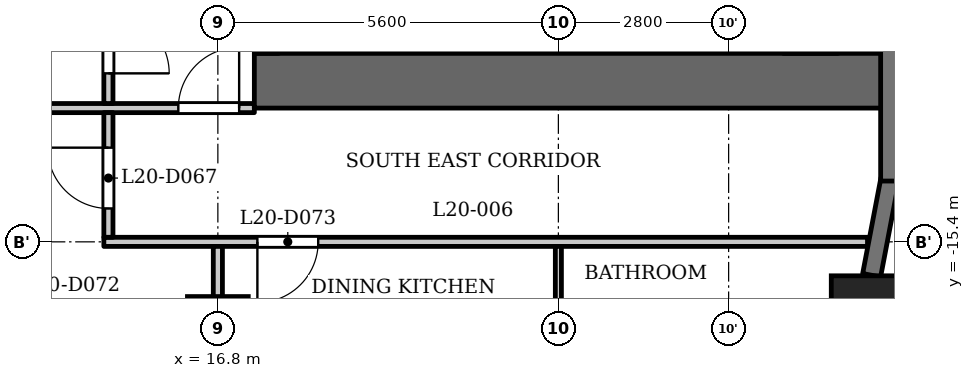
"""IFC4 building model, lengths in metres.
Left out: names, types, materials, properties, quantities, classifications, styles, units other than length and angle.
Written with IfcOpenShell. Run it as: python <this file> out.ifc"""

import sys

from ifc_helpers import new_model, si_unit, direction, frame, frame_2d, origin, origin_2d, place, context, subcontext, project, spatial, rectangle, extrude, element, fill, save


model = new_model("IFC4")
c1 = context("Model", 3, precision=1e-05, world=origin(), true_north=direction((0.0, 1.0)))
c2 = subcontext(c1, "Body", "Model", "MODEL_VIEW")
j1 = project(units=[si_unit("LENGTHUNIT", "METRE"), si_unit("PLANEANGLEUNIT", "RADIAN")], contexts=[c1])
p1 = place(None, origin())
s1 = spatial("IfcSite", under=j1, at=p1, CompositionType="ELEMENT")
p2 = place(p1, origin())
s2 = spatial("IfcBuilding", under=s1, at=p2, CompositionType="ELEMENT")
p3 = place(p2, frame((0.0, 0.0, 83.3)))
s3 = spatial("IfcBuildingStorey", under=s2, at=p3, CompositionType="ELEMENT", Elevation=83.3)
p4 = place(p3, frame((27.538, -16.609, 0.0), z_axis=(0.0, 0.0, 1.0), x_axis=(1.0, 0.0, 0.0)))
e1 = element("IfcColumn", 1, at=p4, inside=s3, PredefinedType="COLUMN", context=c2, shape_type="SweptSolid", body=[
    extrude(rectangle(XDim=1.3, YDim=1.3, at=origin_2d()), origin(), (0.0, 0.0, 1.0), 3.5),
])
p5 = place(p3, frame((16.8, -16.8, 0.0), z_axis=(0.0, 0.0, 1.0), x_axis=(1.0, 0.0, 0.0)))
e2 = element("IfcColumn", 2, at=p5, inside=s3, PredefinedType="COLUMN", context=c2, shape_type="SweptSolid", body=[
    extrude(rectangle(XDim=1.0, YDim=1.0, at=origin_2d()), origin(), (0.0, 0.0, 1.0), 3.5),
])
p6 = place(p3, frame((27.552, -15.949, 0.0), z_axis=(0.0, 0.0, 1.0), x_axis=(0.187279751651, 0.982306619453, 0.0)))
e3 = element("IfcWall", 3, at=p6, inside=s3, PredefinedType="SOLIDWALL", context=c2, shape_type="SweptSolid", body=[
    extrude(rectangle(XDim=1.606, YDim=0.3, at=frame_2d((0.803, 0.0))), origin(), (0.0, 0.0, 1.0), 2.4),
])
p7 = place(p3, frame((27.85, -14.4, 0.0), z_axis=(0.0, 0.0, 1.0), x_axis=(0.0, 1.0, 0.0)))
e4 = element("IfcWall", 4, at=p7, inside=s3, PredefinedType="SOLIDWALL", context=c2, shape_type="SweptSolid", body=[
    extrude(rectangle(XDim=2.55, YDim=0.3, at=frame_2d((1.275, 0.0))), origin(), (0.0, 0.0, 1.0), 2.4),
])
p8 = place(p3, frame((17.4, -12.75, 0.0), z_axis=(0.0, 0.0, 1.0), x_axis=(1.0, 0.0, 0.0)))
e5 = element("IfcWall", 5, at=p8, inside=s3, PredefinedType="SHEAR", context=c2, shape_type="SweptSolid", body=[
    extrude(rectangle(XDim=10.4, YDim=0.9, at=frame_2d((5.2, 0.0))), origin(), (0.0, 0.0, 1.0), 3.2),
])
p9 = place(p3, frame((17.6, -12.3, 0.0), z_axis=(0.0, 0.0, 1.0), x_axis=(0.0, 1.0, 0.0)))
e6 = element("IfcWall", 6, at=p9, inside=s3, PredefinedType="SHEAR", context=c2, shape_type="SweptSolid", body=[
    extrude(rectangle(XDim=24.6, YDim=0.4, at=frame_2d((12.3, 0.0))), origin(), (0.0, 0.0, 1.0), 3.2),
])
p10 = place(p9, frame((6.0, 0.0, 0.0)))
e7 = element("IfcOpeningElement", 7, at=p10, cuts=e6, PredefinedType="OPENING", context=c2, shape_type="SweptSolid", body=[
    extrude(rectangle(XDim=1.1, YDim=2.1, at=frame_2d((0.55, 1.05))), frame((0.0, 0.21, 0.0), z_axis=(0.0, -1.0, 0.0), x_axis=(1.0, 0.0, 0.0)), (0.0, 0.0, 1.0), 0.42),
])
p11 = place(p9, frame((8.4, 0.0, 0.0)))
e8 = element("IfcOpeningElement", 8, at=p11, cuts=e6, PredefinedType="OPENING", context=c2, shape_type="SweptSolid", body=[
    extrude(rectangle(XDim=1.1, YDim=2.1, at=frame_2d((0.55, 1.05))), frame((0.0, 0.21, 0.0), z_axis=(0.0, -1.0, 0.0), x_axis=(1.0, 0.0, 0.0)), (0.0, 0.0, 1.0), 0.42),
])
p12 = place(p9, frame((10.8, 0.0, 0.0)))
e9 = element("IfcOpeningElement", 9, at=p12, cuts=e6, PredefinedType="OPENING", context=c2, shape_type="SweptSolid", body=[
    extrude(rectangle(XDim=1.1, YDim=2.1, at=frame_2d((0.55, 1.05))), frame((0.0, 0.21, 0.0), z_axis=(0.0, -1.0, 0.0), x_axis=(1.0, 0.0, 0.0)), (0.0, 0.0, 1.0), 0.42),
])
p13 = place(p9, frame((16.75, 0.0, 0.0)))
e10 = element("IfcOpeningElement", 10, at=p13, cuts=e6, PredefinedType="OPENING", context=c2, shape_type="SweptSolid", body=[
    extrude(rectangle(XDim=0.9, YDim=2.1, at=frame_2d((0.45, 1.05))), frame((0.0, 0.21, 0.0), z_axis=(0.0, -1.0, 0.0), x_axis=(1.0, 0.0, 0.0)), (0.0, 0.0, 1.0), 0.42),
])
p14 = place(p9, frame((22.8, 0.0, 0.0)))
e11 = element("IfcOpeningElement", 11, at=p14, cuts=e6, PredefinedType="OPENING", context=c2, shape_type="SweptSolid", body=[
    extrude(rectangle(XDim=1.1, YDim=2.1, at=frame_2d((0.55, 1.05))), frame((0.0, 0.21, 0.0), z_axis=(0.0, -1.0, 0.0), x_axis=(1.0, 0.0, 0.0)), (0.0, 0.0, 1.0), 0.42),
])
p15 = place(p9, frame((0.7, 0.0, 0.0)))
e12 = element("IfcOpeningElement", 12, at=p15, cuts=e6, PredefinedType="OPENING", context=c2, shape_type="SweptSolid", body=[
    extrude(rectangle(XDim=1.1, YDim=2.1, at=frame_2d((0.55, 1.05))), frame((0.0, 0.21, 0.0), z_axis=(0.0, -1.0, 0.0), x_axis=(1.0, 0.0, 0.0)), (0.0, 0.0, 1.0), 0.42),
])
p16 = place(p9, frame((12.775, 0.0, 0.0)))
e13 = element("IfcOpeningElement", 13, at=p16, cuts=e6, PredefinedType="OPENING", context=c2, shape_type="SweptSolid", body=[
    extrude(rectangle(XDim=1.8, YDim=2.1, at=frame_2d((0.9, 1.05))), frame((0.0, 0.21, 0.0), z_axis=(0.0, -1.0, 0.0), x_axis=(1.0, 0.0, 0.0)), (0.0, 0.0, 1.0), 0.42),
])
p17 = place(p3, frame((26.55, -12.3, 0.0), z_axis=(0.0, 0.0, 1.0), x_axis=(0.0, 1.0, 0.0)))
e14 = element("IfcWall", 14, at=p17, inside=s3, PredefinedType="SHEAR", context=c2, shape_type="SweptSolid", body=[
    extrude(rectangle(XDim=24.6, YDim=0.9, at=frame_2d((12.3, 0.0))), origin(), (0.0, 0.0, 1.0), 3.2),
])
p18 = place(p3, frame((23.55, -12.3, 0.0), z_axis=(0.0, 0.0, 1.0), x_axis=(0.0, 1.0, 0.0)))
e15 = element("IfcWall", 15, at=p18, inside=s3, PredefinedType="PARTITIONING", context=c2, shape_type="SweptSolid", body=[
    extrude(rectangle(XDim=2.5, YDim=0.2, at=frame_2d((1.25, 0.0))), origin(), (0.0, 0.0, 1.0), 3.2),
])
p19 = place(p18, frame((0.8, 0.0, 0.0)))
e16 = element("IfcOpeningElement", 16, at=p19, cuts=e15, PredefinedType="OPENING", context=c2, shape_type="SweptSolid", body=[
    extrude(rectangle(XDim=0.9, YDim=2.1, at=frame_2d((0.45, 1.05))), frame((0.0, 0.11, 0.0), z_axis=(0.0, -1.0, 0.0), x_axis=(1.0, 0.0, 0.0)), (0.0, 0.0, 1.0), 0.22),
])
p20 = place(p3, frame((14.925, -15.4, 0.0), z_axis=(0.0, 0.0, 1.0), x_axis=(1.0, 0.0, 0.0)))
e17 = element("IfcWall", 17, at=p20, inside=s3, PredefinedType="PARTITIONING", context=c2, shape_type="SweptSolid", body=[
    extrude(rectangle(XDim=12.559, YDim=0.15, at=frame_2d((6.279, 0.0))), origin(), (0.0, 0.0, 1.0), 3.2),
])
p21 = place(p20, frame((2.525, 0.0, 0.0)))
e18 = element("IfcOpeningElement", 18, at=p21, cuts=e17, PredefinedType="OPENING", context=c2, shape_type="SweptSolid", body=[
    extrude(rectangle(XDim=1.0, YDim=2.1, at=frame_2d((0.5, 1.05))), frame((0.0, 0.085, 0.0), z_axis=(0.0, -1.0, 0.0), x_axis=(1.0, 0.0, 0.0)), (0.0, 0.0, 1.0), 0.17),
])
p22 = place(p3, frame((-17.4, -13.2, 0.0), z_axis=(0.0, 0.0, 1.0), x_axis=(1.0, 0.0, 0.0)))
e19 = element("IfcWall", 19, at=p22, inside=s3, PredefinedType="PARTITIONING", context=c2, shape_type="SweptSolid", body=[
    extrude(rectangle(XDim=34.8, YDim=0.15, at=frame_2d((17.4, 0.0))), origin(), (0.0, 0.0, 1.0), 3.2),
])
p23 = place(p22, frame((0.15, 0.0, 0.0)))
e20 = element("IfcOpeningElement", 20, at=p23, cuts=e19, PredefinedType="OPENING", context=c2, shape_type="SweptSolid", body=[
    extrude(rectangle(XDim=1.0, YDim=2.1, at=frame_2d((0.5, 1.05))), frame((0.0, 0.085, 0.0), z_axis=(0.0, -1.0, 0.0), x_axis=(1.0, 0.0, 0.0)), (0.0, 0.0, 1.0), 0.17),
])
p24 = place(p22, frame((33.55, 0.0, 0.0)))
e21 = element("IfcOpeningElement", 21, at=p24, cuts=e19, PredefinedType="OPENING", context=c2, shape_type="SweptSolid", body=[
    extrude(rectangle(XDim=1.0, YDim=2.1, at=frame_2d((0.5, 1.05))), frame((0.0, 0.085, 0.0), z_axis=(0.0, -1.0, 0.0), x_axis=(1.0, 0.0, 0.0)), (0.0, 0.0, 1.0), 0.17),
])
p25 = place(p22, frame((7.35, 0.0, 0.0)))
e22 = element("IfcOpeningElement", 22, at=p25, cuts=e19, PredefinedType="OPENING", context=c2, shape_type="SweptSolid", body=[
    extrude(rectangle(XDim=1.0, YDim=2.1, at=frame_2d((0.5, 1.05))), frame((0.0, 0.085, 0.0), z_axis=(0.0, -1.0, 0.0), x_axis=(1.0, 0.0, 0.0)), (0.0, 0.0, 1.0), 0.17),
])
p26 = place(p22, frame((13.7, 0.0, 0.0)))
e23 = element("IfcOpeningElement", 23, at=p26, cuts=e19, PredefinedType="OPENING", context=c2, shape_type="SweptSolid", body=[
    extrude(rectangle(XDim=1.0, YDim=2.1, at=frame_2d((0.5, 1.05))), frame((0.0, 0.085, 0.0), z_axis=(0.0, -1.0, 0.0), x_axis=(1.0, 0.0, 0.0)), (0.0, 0.0, 1.0), 0.17),
])
p27 = place(p22, frame((19.3, 0.0, 0.0)))
e24 = element("IfcOpeningElement", 24, at=p27, cuts=e19, PredefinedType="OPENING", context=c2, shape_type="SweptSolid", body=[
    extrude(rectangle(XDim=1.0, YDim=2.1, at=frame_2d((0.5, 1.05))), frame((0.0, 0.085, 0.0), z_axis=(0.0, -1.0, 0.0), x_axis=(1.0, 0.0, 0.0)), (0.0, 0.0, 1.0), 0.17),
])
p28 = place(p3, frame((15.0, -15.325, 0.0), z_axis=(0.0, 0.0, 1.0), x_axis=(0.0, 1.0, 0.0)))
e25 = element("IfcWall", 25, at=p28, inside=s3, PredefinedType="PARTITIONING", context=c2, shape_type="SweptSolid", body=[
    extrude(rectangle(XDim=2.05, YDim=0.15, at=frame_2d((1.025, 0.0))), origin(), (0.0, 0.0, 1.0), 3.2),
])
p29 = place(p28, frame((0.474, 0.0, 0.0)))
e26 = element("IfcOpeningElement", 26, at=p29, cuts=e25, PredefinedType="OPENING", context=c2, shape_type="SweptSolid", body=[
    extrude(rectangle(XDim=1.0, YDim=2.1, at=frame_2d((0.5, 1.05))), frame((0.0, 0.085, 0.0), z_axis=(0.0, -1.0, 0.0), x_axis=(1.0, 0.0, 0.0)), (0.0, 0.0, 1.0), 0.17),
])
p30 = place(p3, frame((15.0, -13.125, 0.0), z_axis=(0.0, 0.0, 1.0), x_axis=(0.0, 1.0, 0.0)))
e27 = element("IfcWall", 27, at=p30, inside=s3, PredefinedType="PARTITIONING", context=c2, shape_type="SweptSolid", body=[
    extrude(rectangle(XDim=6.356, YDim=0.15, at=frame_2d((3.178, 0.0))), origin(), (0.0, 0.0, 1.0), 3.2),
])
p31 = place(p30, frame((0.496, 0.0, 0.0)))
e28 = element("IfcOpeningElement", 28, at=p31, cuts=e27, PredefinedType="OPENING", context=c2, shape_type="SweptSolid", body=[
    extrude(rectangle(XDim=1.0, YDim=2.1, at=frame_2d((0.5, 1.05))), frame((0.0, 0.085, 0.0), z_axis=(0.0, -1.0, 0.0), x_axis=(1.0, 0.0, 0.0)), (0.0, 0.0, 1.0), 0.17),
])
p32 = place(p3, frame((16.8, -23.03, 0.0), z_axis=(0.0, 0.0, 1.0), x_axis=(0.0, 1.0, 0.0)))
e29 = element("IfcWall", 29, at=p32, inside=s3, PredefinedType="PARTITIONING", context=c2, shape_type="SweptSolid", body=[
    extrude(rectangle(XDim=7.555, YDim=0.15, at=frame_2d((3.777, 0.0))), origin(), (0.0, 0.0, 1.0), 3.2),
])
p33 = place(p3, frame((22.4, -18.05, 0.0), z_axis=(0.0, 0.0, 1.0), x_axis=(0.0, 1.0, 0.0)))
e30 = element("IfcWall", 30, at=p33, inside=s3, PredefinedType="PARTITIONING", context=c2, shape_type="SweptSolid", body=[
    extrude(rectangle(XDim=2.575, YDim=0.1, at=frame_2d((1.288, 0.0))), origin(), (0.0, 0.0, 1.0), 3.2),
])
p34 = place(p31, origin())
e31 = element("IfcDoor", 31, at=p34, inside=s3, OperationType="SINGLE_SWING_LEFT", PredefinedType="DOOR", context=c2, shape_type="SweptSolid", body=[
    extrude(rectangle(XDim=1.0, YDim=2.1, at=frame_2d((0.5, 1.05))), frame((0.0, 0.025, 0.0), z_axis=(0.0, -1.0, 0.0), x_axis=(1.0, 0.0, 0.0)), (0.0, 0.0, 1.0), 0.05),
])
fill(e28, e31)
p35 = place(p24, origin())
e32 = element("IfcDoor", 32, at=p35, inside=s3, OperationType="SINGLE_SWING_LEFT", PredefinedType="DOOR", context=c2, shape_type="SweptSolid", body=[
    extrude(rectangle(XDim=1.0, YDim=2.1, at=frame_2d((0.5, 1.05))), frame((0.0, 0.025, 0.0), z_axis=(0.0, -1.0, 0.0), x_axis=(1.0, 0.0, 0.0)), (0.0, 0.0, 1.0), 0.05),
])
fill(e21, e32)
p36 = place(p29, origin())
e33 = element("IfcDoor", 33, at=p36, inside=s3, OperationType="SINGLE_SWING_LEFT", PredefinedType="DOOR", context=c2, shape_type="SweptSolid", body=[
    extrude(rectangle(XDim=1.0, YDim=2.1, at=frame_2d((0.5, 1.05))), frame((0.0, 0.025, 0.0), z_axis=(0.0, -1.0, 0.0), x_axis=(1.0, 0.0, 0.0)), (0.0, 0.0, 1.0), 0.05),
])
fill(e26, e33)
p37 = place(p21, origin())
e34 = element("IfcDoor", 34, at=p37, inside=s3, OperationType="SINGLE_SWING_LEFT", PredefinedType="DOOR", context=c2, shape_type="SweptSolid", body=[
    extrude(rectangle(XDim=1.0, YDim=2.1, at=frame_2d((0.5, 1.05))), frame((0.0, 0.025, 0.0), z_axis=(0.0, -1.0, 0.0), x_axis=(1.0, 0.0, 0.0)), (0.0, 0.0, 1.0), 0.05),
])
fill(e18, e34)
save(model, sys.argv[1])
